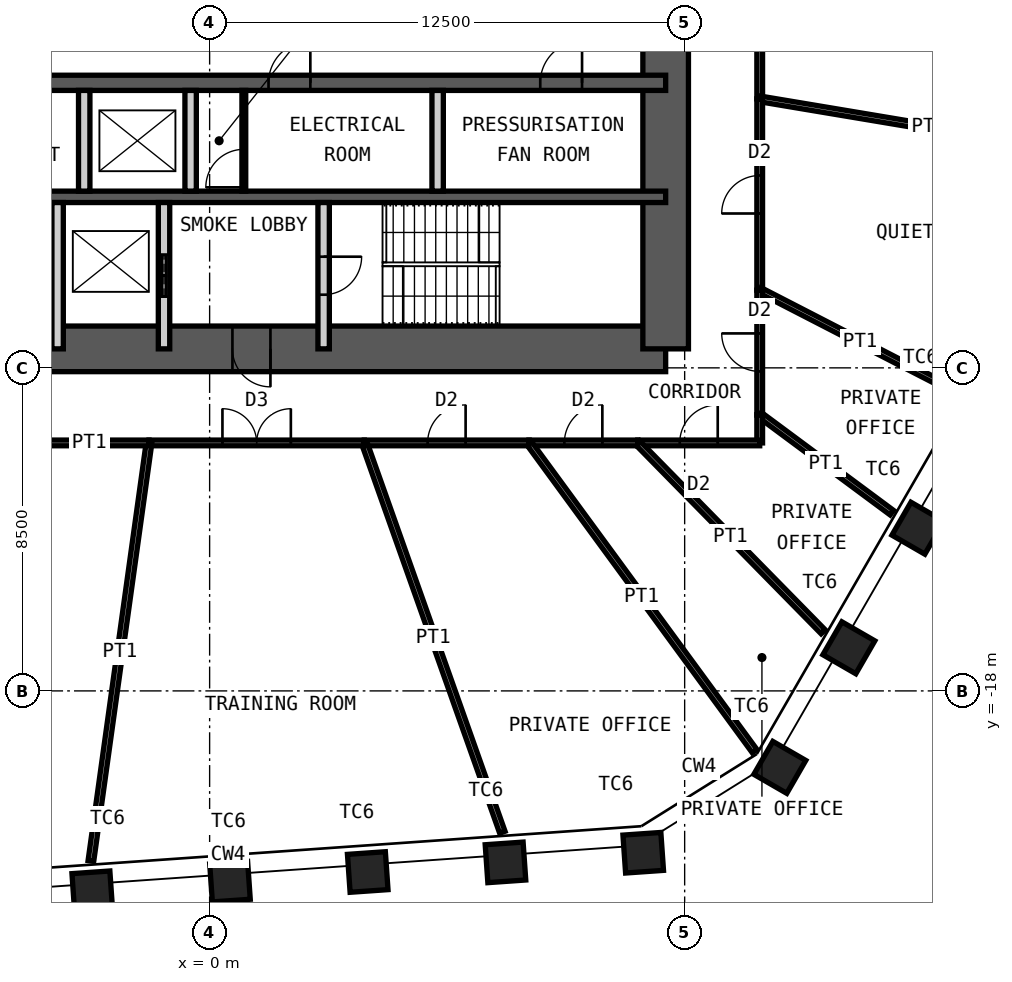
"""IFC4 building model, lengths in metres.
Left out: names, types, materials, properties, quantities, classifications, styles, units other than length and angle.
Written with IfcOpenShell. Run it as: python <this file> out.ifc"""

import sys

from ifc_helpers import new_model, si_unit, direction, frame, frame_2d, origin, origin_2d, place, context, subcontext, project, spatial, rectangle, hollow_rectangle, extrude, element, fill, save


model = new_model("IFC4")
c1 = context("Model", 3, precision=1e-05, world=origin(), true_north=direction((0.0, 1.0)))
c2 = subcontext(c1, "Body", "Model", "MODEL_VIEW")
j1 = project(units=[si_unit("LENGTHUNIT", "METRE"), si_unit("PLANEANGLEUNIT", "RADIAN")], contexts=[c1])
p1 = place(None, origin())
s1 = spatial("IfcSite", under=j1, at=p1, CompositionType="ELEMENT")
p2 = place(p1, origin())
s2 = spatial("IfcBuilding", under=s1, at=p2, CompositionType="ELEMENT")
p3 = place(p2, frame((0.0, 0.0, 239.2)))
s3 = spatial("IfcBuildingStorey", under=s2, at=p3, CompositionType="ELEMENT", Elevation=239.2)
for number, where, z_axis, x_axis in (
    (1, (18.637, -13.719, 0.0), (0.0, 0.0, 1.0), (0.5, 0.866, 0.0)),
    (2, (16.821, -16.866, 0.0), (0.0, 0.0, 1.0), (0.5, 0.866, 0.0)),
    (3, (15.004, -20.012, 0.0), (0.0, 0.0, 1.0), (0.5, 0.866, 0.0)),
    (4, (11.41, -22.258, 0.0), (0.0, 0.0, 1.0), (0.998, 0.07, 0.0)),
    (5, (7.785, -22.512, 0.0), (0.0, 0.0, 1.0), (0.998, 0.07, 0.0)),
    (6, (4.16, -22.765, 0.0), (0.0, 0.0, 1.0), (0.998, 0.07, 0.0)),
    (7, (0.536, -23.019, 0.0), (0.0, 0.0, 1.0), (0.998, 0.07, 0.0)),
    (8, (-3.089, -23.272, 0.0), (0.0, 0.0, 1.0), (0.998, 0.07, 0.0)),
):
    element("IfcColumn", number, at=place(p3, frame(where, z_axis=z_axis, x_axis=x_axis)), inside=s3, PredefinedType="COLUMN", context=c2, shape_type="SweptSolid", body=[
        extrude(hollow_rectangle(XDim=1.0, YDim=1.0, WallThickness=0.06, at=origin_2d()), origin(), (0.0, 0.0, 1.0), 4.2),
    ])
p4 = place(p3, frame((-12.0, -9.0, 0.0), z_axis=(0.0, 0.0, 1.0), x_axis=(1.0, 0.0, 0.0)))
e9 = element("IfcWall", 9, at=p4, inside=s3, PredefinedType="SHEAR", context=c2, shape_type="SweptSolid", body=[
    extrude(rectangle(XDim=24.0, YDim=1.2, at=frame_2d((12.0, 0.0))), origin(), (0.0, 0.0, 1.0), 4.2),
])
p5 = place(p4, frame((1.35, 0.0, 0.0)))
e10 = element("IfcOpeningElement", 10, at=p5, cuts=e9, PredefinedType="OPENING", context=c2, shape_type="SweptSolid", body=[
    extrude(rectangle(XDim=1.0, YDim=2.1, at=frame_2d((0.5, 1.05))), frame((0.0, 0.61, 0.0), z_axis=(0.0, -1.0, 0.0), x_axis=(1.0, 0.0, 0.0)), (0.0, 0.0, 1.0), 1.22),
])
p6 = place(p4, frame((5.325, 0.0, 0.0)))
e11 = element("IfcOpeningElement", 11, at=p6, cuts=e9, PredefinedType="OPENING", context=c2, shape_type="SweptSolid", body=[
    extrude(rectangle(XDim=1.15, YDim=2.1, at=frame_2d((0.575, 1.05))), frame((0.0, 0.61, 0.0), z_axis=(0.0, -1.0, 0.0), x_axis=(1.0, 0.0, 0.0)), (0.0, 0.0, 1.0), 1.22),
])
p7 = place(p4, frame((12.6, 0.0, 0.0)))
e12 = element("IfcOpeningElement", 12, at=p7, cuts=e9, PredefinedType="OPENING", context=c2, shape_type="SweptSolid", body=[
    extrude(rectangle(XDim=1.0, YDim=2.1, at=frame_2d((0.5, 1.05))), frame((0.0, 0.61, 0.0), z_axis=(0.0, -1.0, 0.0), x_axis=(1.0, 0.0, 0.0)), (0.0, 0.0, 1.0), 1.22),
])
p8 = place(p3, frame((12.0, -9.0, 0.0), z_axis=(0.0, 0.0, 1.0), x_axis=(0.0, 1.0, 0.0)))
e13 = element("IfcWall", 13, at=p8, inside=s3, PredefinedType="SHEAR", context=c2, shape_type="SweptSolid", body=[
    extrude(rectangle(XDim=18.0, YDim=1.2, at=frame_2d((9.0, 0.0))), origin(), (0.0, 0.0, 1.0), 4.2),
])
p9 = place(p8, frame((8.1, 0.0, 0.0)))
e14 = element("IfcOpeningElement", 14, at=p9, cuts=e13, PredefinedType="OPENING", context=c2, shape_type="SweptSolid", body=[
    extrude(rectangle(XDim=1.8, YDim=2.1, at=frame_2d((0.9, 1.05))), frame((0.0, 0.61, 0.0), z_axis=(0.0, -1.0, 0.0), x_axis=(1.0, 0.0, 0.0)), (0.0, 0.0, 1.0), 1.22),
])
p10 = place(p3, frame((-12.0, -2.0, 0.0), z_axis=(0.0, 0.0, 1.0), x_axis=(1.0, 0.0, 0.0)))
e15 = element("IfcWall", 15, at=p10, inside=s3, PredefinedType="SHEAR", context=c2, shape_type="SweptSolid", body=[
    extrude(rectangle(XDim=24.0, YDim=0.4, at=frame_2d((12.0, 0.0))), origin(), (0.0, 0.0, 1.0), 4.2),
])
p11 = place(p10, frame((1.1, 0.0, 0.0)))
e16 = element("IfcOpeningElement", 16, at=p11, cuts=e15, PredefinedType="OPENING", context=c2, shape_type="SweptSolid", body=[
    extrude(rectangle(XDim=1.1, YDim=2.1, at=frame_2d((0.55, 1.05))), frame((0.0, 0.21, 0.0), z_axis=(0.0, -1.0, 0.0), x_axis=(1.0, 0.0, 0.0)), (0.0, 0.0, 1.0), 0.42),
])
p12 = place(p10, frame((13.55, 0.0, 0.0)))
e17 = element("IfcOpeningElement", 17, at=p12, cuts=e15, PredefinedType="OPENING", context=c2, shape_type="SweptSolid", body=[
    extrude(rectangle(XDim=1.1, YDim=2.1, at=frame_2d((0.55, 1.05))), frame((0.0, 0.21, 0.0), z_axis=(0.0, -1.0, 0.0), x_axis=(1.0, 0.0, 0.0)), (0.0, 0.0, 1.0), 0.42),
])
p13 = place(p10, frame((20.7, 0.0, 0.0)))
e18 = element("IfcOpeningElement", 18, at=p13, cuts=e15, PredefinedType="OPENING", context=c2, shape_type="SweptSolid", body=[
    extrude(rectangle(XDim=1.1, YDim=2.1, at=frame_2d((0.55, 1.05))), frame((0.0, 0.21, 0.0), z_axis=(0.0, -1.0, 0.0), x_axis=(1.0, 0.0, 0.0)), (0.0, 0.0, 1.0), 0.42),
])
p14 = place(p10, frame((4.0, 0.0, 0.0)))
e19 = element("IfcOpeningElement", 19, at=p14, cuts=e15, PredefinedType="OPENING", context=c2, shape_type="SweptSolid", body=[
    extrude(rectangle(XDim=1.0, YDim=2.1, at=frame_2d((0.5, 1.05))), frame((0.0, 0.21, 0.0), z_axis=(0.0, -1.0, 0.0), x_axis=(1.0, 0.0, 0.0)), (0.0, 0.0, 1.0), 0.42),
])
p15 = place(p10, frame((6.8, 0.0, 0.0)))
e20 = element("IfcOpeningElement", 20, at=p15, cuts=e15, PredefinedType="OPENING", context=c2, shape_type="SweptSolid", body=[
    extrude(rectangle(XDim=1.0, YDim=2.1, at=frame_2d((0.5, 1.05))), frame((0.0, 0.21, 0.0), z_axis=(0.0, -1.0, 0.0), x_axis=(1.0, 0.0, 0.0)), (0.0, 0.0, 1.0), 0.42),
])
p16 = place(p3, frame((-12.0, -5.0, 0.0), z_axis=(0.0, 0.0, 1.0), x_axis=(1.0, 0.0, 0.0)))
e21 = element("IfcWall", 21, at=p16, inside=s3, PredefinedType="SHEAR", context=c2, shape_type="SweptSolid", body=[
    extrude(rectangle(XDim=24.0, YDim=0.3, at=frame_2d((12.0, 0.0))), origin(), (0.0, 0.0, 1.0), 4.2),
])
for number, where, z_axis, x_axis in (
    (22, (-3.3, -4.85, 0.0), (0.0, 0.0, 1.0), (0.0, 1.0, 0.0)),
    (23, (-0.5, -4.85, 0.0), (0.0, 0.0, 1.0), (0.0, 1.0, 0.0)),
    (24, (6.0, -4.85, 0.0), (0.0, 0.0, 1.0), (0.0, 1.0, 0.0)),
):
    element("IfcWall", number, at=place(p3, frame(where, z_axis=z_axis, x_axis=x_axis)), inside=s3, PredefinedType="PARTITIONING", context=c2, shape_type="SweptSolid", body=[
        extrude(rectangle(XDim=2.65, YDim=0.3, at=frame_2d((1.325, 0.0))), origin(), (0.0, 0.0, 1.0), 3.98),
    ])
p17 = place(p3, frame((-4.0, -9.0, 0.0), z_axis=(0.0, 0.0, 1.0), x_axis=(0.0, 1.0, 0.0)))
e25 = element("IfcWall", 25, at=p17, inside=s3, PredefinedType="PARTITIONING", context=c2, shape_type="SweptSolid", body=[
    extrude(rectangle(XDim=3.85, YDim=0.3, at=frame_2d((1.925, 0.0))), origin(), (0.0, 0.0, 1.0), 3.98),
])
p18 = place(p3, frame((-1.2, -9.0, 0.0), z_axis=(0.0, 0.0, 1.0), x_axis=(0.0, 1.0, 0.0)))
e26 = element("IfcWall", 26, at=p18, inside=s3, PredefinedType="PARTITIONING", context=c2, shape_type="SweptSolid", body=[
    extrude(rectangle(XDim=3.85, YDim=0.3, at=frame_2d((1.925, 0.0))), origin(), (0.0, 0.0, 1.0), 3.98),
])
p19 = place(p18, frame((1.375, 0.0, 0.0)))
e27 = element("IfcOpeningElement", 27, at=p19, cuts=e26, PredefinedType="OPENING", context=c2, shape_type="SweptSolid", body=[
    extrude(rectangle(XDim=1.1, YDim=2.4, at=frame_2d((0.55, 1.2))), frame((0.0, 0.16, 0.0), z_axis=(0.0, -1.0, 0.0), x_axis=(1.0, 0.0, 0.0)), (0.0, 0.0, 1.0), 0.32),
])
p20 = place(p3, frame((3.0, -9.0, 0.0), z_axis=(0.0, 0.0, 1.0), x_axis=(0.0, 1.0, 0.0)))
e28 = element("IfcWall", 28, at=p20, inside=s3, PredefinedType="PARTITIONING", context=c2, shape_type="SweptSolid", body=[
    extrude(rectangle(XDim=3.85, YDim=0.3, at=frame_2d((1.925, 0.0))), origin(), (0.0, 0.0, 1.0), 3.98),
])
p21 = place(p20, frame((1.425, 0.0, 0.0)))
e29 = element("IfcOpeningElement", 29, at=p21, cuts=e28, PredefinedType="OPENING", context=c2, shape_type="SweptSolid", body=[
    extrude(rectangle(XDim=1.0, YDim=2.1, at=frame_2d((0.5, 1.05))), frame((0.0, 0.16, 0.0), z_axis=(0.0, -1.0, 0.0), x_axis=(1.0, 0.0, 0.0)), (0.0, 0.0, 1.0), 0.32),
])
p22 = place(p3, frame((0.9, -4.85, 0.0), z_axis=(0.0, 0.0, 1.0), x_axis=(0.0, 1.0, 0.0)))
e30 = element("IfcWall", 30, at=p22, inside=s3, PredefinedType="PARTITIONING", context=c2, shape_type="SweptSolid", body=[
    extrude(rectangle(XDim=2.65, YDim=0.1, at=frame_2d((1.325, 0.0))), origin(), (0.0, 0.0, 1.0), 3.98),
])
p23 = place(p22, frame((0.1, 0.0, 0.0)))
e31 = element("IfcOpeningElement", 31, at=p23, cuts=e30, PredefinedType="OPENING", context=c2, shape_type="SweptSolid", body=[
    extrude(rectangle(XDim=1.0, YDim=2.4, at=frame_2d((0.5, 1.2))), frame((0.0, 0.06, 0.0), z_axis=(0.0, -1.0, 0.0), x_axis=(1.0, 0.0, 0.0)), (0.0, 0.0, 1.0), 0.12),
])
p24 = place(p3, frame((14.475, 3.475, 0.0), z_axis=(0.0, 0.0, 1.0), x_axis=(0.0, -1.0, 0.0)))
e32 = element("IfcWall", 32, at=p24, inside=s3, PredefinedType="PARTITIONING", context=c2, shape_type="SweptSolid", body=[
    extrude(rectangle(XDim=5.896, YDim=0.15, at=frame_2d((2.948, 0.0))), origin(), (0.0, 0.0, 1.0), 4.03),
])
p25 = place(p24, frame((2.448, 0.0, 0.0)))
e33 = element("IfcOpeningElement", 33, at=p25, cuts=e32, PredefinedType="OPENING", context=c2, shape_type="SweptSolid", body=[
    extrude(rectangle(XDim=1.0, YDim=2.4, at=frame_2d((0.5, 1.2))), frame((0.0, 0.085, 0.0), z_axis=(0.0, -1.0, 0.0), x_axis=(1.0, 0.0, 0.0)), (0.0, 0.0, 1.0), 0.17),
])
p26 = place(p3, frame((23.383, -3.912, 0.0), z_axis=(0.0, 0.0, 1.0), x_axis=(-0.986293651891, 0.164999491631, 0.0)))
e34 = element("IfcWall", 34, at=p26, inside=s3, PredefinedType="PARTITIONING", context=c2, shape_type="SweptSolid", body=[
    extrude(rectangle(XDim=9.032, YDim=0.15, at=frame_2d((4.516, 0.0))), origin(), (0.0, 0.0, 1.0), 3.43),
])
p27 = place(p3, frame((14.475, -2.422, 0.0), z_axis=(0.0, 0.0, 1.0), x_axis=(0.0, -1.0, 0.0)))
e35 = element("IfcWall", 35, at=p27, inside=s3, PredefinedType="PARTITIONING", context=c2, shape_type="SweptSolid", body=[
    extrude(rectangle(XDim=5.033, YDim=0.15, at=frame_2d((2.517, 0.0))), origin(), (0.0, 0.0, 1.0), 4.03),
])
p28 = place(p27, frame((2.017, 0.0, 0.0)))
e36 = element("IfcOpeningElement", 36, at=p28, cuts=e35, PredefinedType="OPENING", context=c2, shape_type="SweptSolid", body=[
    extrude(rectangle(XDim=1.0, YDim=2.4, at=frame_2d((0.5, 1.2))), frame((0.0, 0.085, 0.0), z_axis=(0.0, -1.0, 0.0), x_axis=(1.0, 0.0, 0.0)), (0.0, 0.0, 1.0), 0.17),
])
p29 = place(p3, frame((19.759, -10.177, 0.0), z_axis=(0.0, 0.0, 1.0), x_axis=(-0.889015092721, 0.457877893017, 0.0)))
e37 = element("IfcWall", 37, at=p29, inside=s3, PredefinedType="PARTITIONING", context=c2, shape_type="SweptSolid", body=[
    extrude(rectangle(XDim=5.944, YDim=0.15, at=frame_2d((2.972, 0.0))), origin(), (0.0, 0.0, 1.0), 3.43),
])
p30 = place(p3, frame((14.475, -7.455, 0.0), z_axis=(0.0, 0.0, 1.0), x_axis=(0.0, -1.0, 0.0)))
e38 = element("IfcWall", 38, at=p30, inside=s3, PredefinedType="PARTITIONING", context=c2, shape_type="SweptSolid", body=[
    extrude(rectangle(XDim=3.277, YDim=0.15, at=frame_2d((1.639, 0.0))), origin(), (0.0, 0.0, 1.0), 4.03),
])
p31 = place(p30, frame((1.139, 0.0, 0.0)))
e39 = element("IfcOpeningElement", 39, at=p31, cuts=e38, PredefinedType="OPENING", context=c2, shape_type="SweptSolid", body=[
    extrude(rectangle(XDim=1.0, YDim=2.4, at=frame_2d((0.5, 1.2))), frame((0.0, 0.085, 0.0), z_axis=(0.0, -1.0, 0.0), x_axis=(1.0, 0.0, 0.0)), (0.0, 0.0, 1.0), 0.17),
])
p32 = place(p3, frame((17.951, -13.309, 0.0), z_axis=(0.0, 0.0, 1.0), x_axis=(-0.803285242674, 0.595594508791, 0.0)))
e40 = element("IfcWall", 40, at=p32, inside=s3, PredefinedType="PARTITIONING", context=c2, shape_type="SweptSolid", body=[
    extrude(rectangle(XDim=4.327, YDim=0.15, at=frame_2d((2.164, 0.0))), origin(), (0.0, 0.0, 1.0), 3.43),
])
p33 = place(p3, frame((14.475, -10.732, 0.0), z_axis=(0.0, 0.0, 1.0), x_axis=(0.0, -1.0, 0.0)))
e41 = element("IfcWall", 41, at=p33, inside=s3, PredefinedType="PARTITIONING", context=c2, shape_type="SweptSolid", body=[
    extrude(rectangle(XDim=0.743, YDim=0.15, at=frame_2d((0.372, 0.0))), origin(), (0.0, 0.0, 1.0), 4.03),
])
p34 = place(p3, frame((14.475, -11.475, 0.0), z_axis=(0.0, 0.0, 1.0), x_axis=(-1.0, 0.0, 0.0)))
e42 = element("IfcWall", 42, at=p34, inside=s3, PredefinedType="PARTITIONING", context=c2, shape_type="SweptSolid", body=[
    extrude(rectangle(XDim=3.209, YDim=0.15, at=frame_2d((1.605, 0.0))), origin(), (0.0, 0.0, 1.0), 4.03),
])
p35 = place(p34, frame((1.105, 0.0, 0.0)))
e43 = element("IfcOpeningElement", 43, at=p35, cuts=e42, PredefinedType="OPENING", context=c2, shape_type="SweptSolid", body=[
    extrude(rectangle(XDim=1.0, YDim=2.4, at=frame_2d((0.5, 1.2))), frame((0.0, 0.085, 0.0), z_axis=(0.0, -1.0, 0.0), x_axis=(1.0, 0.0, 0.0)), (0.0, 0.0, 1.0), 0.17),
])
p36 = place(p3, frame((16.145, -16.444, 0.0), z_axis=(0.0, 0.0, 1.0), x_axis=(-0.700591378209, 0.71356269576, 0.0)))
e44 = element("IfcWall", 44, at=p36, inside=s3, PredefinedType="PARTITIONING", context=c2, shape_type="SweptSolid", body=[
    extrude(rectangle(XDim=6.964, YDim=0.15, at=frame_2d((3.482, 0.0))), origin(), (0.0, 0.0, 1.0), 3.43),
])
p37 = place(p3, frame((11.266, -11.475, 0.0), z_axis=(0.0, 0.0, 1.0), x_axis=(-1.0, 0.0, 0.0)))
e45 = element("IfcWall", 45, at=p37, inside=s3, PredefinedType="PARTITIONING", context=c2, shape_type="SweptSolid", body=[
    extrude(rectangle(XDim=2.863, YDim=0.15, at=frame_2d((1.432, 0.0))), origin(), (0.0, 0.0, 1.0), 4.03),
])
p38 = place(p37, frame((0.932, 0.0, 0.0)))
e46 = element("IfcOpeningElement", 46, at=p38, cuts=e45, PredefinedType="OPENING", context=c2, shape_type="SweptSolid", body=[
    extrude(rectangle(XDim=1.0, YDim=2.4, at=frame_2d((0.5, 1.2))), frame((0.0, 0.085, 0.0), z_axis=(0.0, -1.0, 0.0), x_axis=(1.0, 0.0, 0.0)), (0.0, 0.0, 1.0), 0.17),
])
p39 = place(p3, frame((14.339, -19.582, 0.0), z_axis=(0.0, 0.0, 1.0), x_axis=(-0.590789413226, 0.806825798559, 0.0)))
e47 = element("IfcWall", 47, at=p39, inside=s3, PredefinedType="PARTITIONING", context=c2, shape_type="SweptSolid", body=[
    extrude(rectangle(XDim=10.048, YDim=0.15, at=frame_2d((5.024, 0.0))), origin(), (0.0, 0.0, 1.0), 2.93),
])
p40 = place(p3, frame((8.403, -11.475, 0.0), z_axis=(0.0, 0.0, 1.0), x_axis=(-1.0, 0.0, 0.0)))
e48 = element("IfcWall", 48, at=p40, inside=s3, PredefinedType="PARTITIONING", context=c2, shape_type="SweptSolid", body=[
    extrude(rectangle(XDim=4.333, YDim=0.15, at=frame_2d((2.167, 0.0))), origin(), (0.0, 0.0, 1.0), 4.03),
])
p41 = place(p40, frame((1.667, 0.0, 0.0)))
e49 = element("IfcOpeningElement", 49, at=p41, cuts=e48, PredefinedType="OPENING", context=c2, shape_type="SweptSolid", body=[
    extrude(rectangle(XDim=1.0, YDim=2.4, at=frame_2d((0.5, 1.2))), frame((0.0, 0.085, 0.0), z_axis=(0.0, -1.0, 0.0), x_axis=(1.0, 0.0, 0.0)), (0.0, 0.0, 1.0), 0.17),
])
p42 = place(p3, frame((7.703, -21.719, 0.0), z_axis=(0.0, 0.0, 1.0), x_axis=(-0.334269551553, 0.942477515331, 0.0)))
e50 = element("IfcWall", 50, at=p42, inside=s3, PredefinedType="PARTITIONING", context=c2, shape_type="SweptSolid", body=[
    extrude(rectangle(XDim=10.869, YDim=0.15, at=frame_2d((5.435, 0.0))), origin(), (0.0, 0.0, 1.0), 3.43),
])
p43 = place(p3, frame((4.07, -11.475, 0.0), z_axis=(0.0, 0.0, 1.0), x_axis=(-1.0, 0.0, 0.0)))
e51 = element("IfcWall", 51, at=p43, inside=s3, PredefinedType="PARTITIONING", context=c2, shape_type="SweptSolid", body=[
    extrude(rectangle(XDim=5.665, YDim=0.15, at=frame_2d((2.832, 0.0))), origin(), (0.0, 0.0, 1.0), 4.03),
])
p44 = place(p43, frame((1.932, 0.0, 0.0)))
e52 = element("IfcOpeningElement", 52, at=p44, cuts=e51, PredefinedType="OPENING", context=c2, shape_type="SweptSolid", body=[
    extrude(rectangle(XDim=1.8, YDim=2.4, at=frame_2d((0.9, 1.2))), frame((0.0, 0.085, 0.0), z_axis=(0.0, -1.0, 0.0), x_axis=(1.0, 0.0, 0.0)), (0.0, 0.0, 1.0), 0.17),
])
p45 = place(p3, frame((-3.124, -22.475, 0.0), z_axis=(0.0, 0.0, 1.0), x_axis=(0.137683997015, 0.990476207168, 0.0)))
e53 = element("IfcWall", 53, at=p45, inside=s3, PredefinedType="PARTITIONING", context=c2, shape_type="SweptSolid", body=[
    extrude(rectangle(XDim=11.105, YDim=0.15, at=frame_2d((5.553, 0.0))), origin(), (0.0, 0.0, 1.0), 3.43),
])
p46 = place(p3, frame((-1.595, -11.475, 0.0), z_axis=(0.0, 0.0, 1.0), x_axis=(-1.0, 0.0, 0.0)))
e54 = element("IfcWall", 54, at=p46, inside=s3, PredefinedType="PARTITIONING", context=c2, shape_type="SweptSolid", body=[
    extrude(rectangle(XDim=7.864, YDim=0.15, at=frame_2d((3.932, 0.0))), origin(), (0.0, 0.0, 1.0), 4.03),
])
p47 = place(p46, frame((3.032, 0.0, 0.0)))
e55 = element("IfcOpeningElement", 55, at=p47, cuts=e54, PredefinedType="OPENING", context=c2, shape_type="SweptSolid", body=[
    extrude(rectangle(XDim=1.8, YDim=2.4, at=frame_2d((0.9, 1.2))), frame((0.0, 0.085, 0.0), z_axis=(0.0, -1.0, 0.0), x_axis=(1.0, 0.0, 0.0)), (0.0, 0.0, 1.0), 0.17),
])
p48 = place(p7, origin())
e56 = element("IfcDoor", 56, at=p48, inside=s3, OperationType="SINGLE_SWING_RIGHT", PredefinedType="DOOR", context=c2, shape_type="SweptSolid", body=[
    extrude(rectangle(XDim=1.0, YDim=2.1, at=frame_2d((0.5, 1.05))), frame((0.0, 0.025, 0.0), z_axis=(0.0, -1.0, 0.0), x_axis=(1.0, 0.0, 0.0)), (0.0, 0.0, 1.0), 0.05),
])
fill(e12, e56)
p49 = place(p21, origin())
e57 = element("IfcDoor", 57, at=p49, inside=s3, OperationType="SINGLE_SWING_RIGHT", PredefinedType="DOOR", context=c2, shape_type="SweptSolid", body=[
    extrude(rectangle(XDim=1.0, YDim=2.1, at=frame_2d((0.5, 1.05))), frame((0.0, 0.025, 0.0), z_axis=(0.0, -1.0, 0.0), x_axis=(1.0, 0.0, 0.0)), (0.0, 0.0, 1.0), 0.05),
])
fill(e29, e57)
p50 = place(p12, origin())
e58 = element("IfcDoor", 58, at=p50, inside=s3, OperationType="SINGLE_SWING_LEFT", PredefinedType="DOOR", context=c2, shape_type="SweptSolid", body=[
    extrude(rectangle(XDim=1.1, YDim=2.1, at=frame_2d((0.55, 1.05))), frame((0.0, 0.025, 0.0), z_axis=(0.0, -1.0, 0.0), x_axis=(1.0, 0.0, 0.0)), (0.0, 0.0, 1.0), 0.05),
])
fill(e17, e58)
p51 = place(p13, origin())
e59 = element("IfcDoor", 59, at=p51, inside=s3, OperationType="SINGLE_SWING_LEFT", PredefinedType="DOOR", context=c2, shape_type="SweptSolid", body=[
    extrude(rectangle(XDim=1.1, YDim=2.1, at=frame_2d((0.55, 1.05))), frame((0.0, 0.025, 0.0), z_axis=(0.0, -1.0, 0.0), x_axis=(1.0, 0.0, 0.0)), (0.0, 0.0, 1.0), 0.05),
])
fill(e18, e59)
p52 = place(p19, origin())
e60 = element("IfcDoor", 60, at=p52, inside=s3, OperationType="DOUBLE_DOOR_SLIDING", PredefinedType="DOOR", context=c2, shape_type="SweptSolid", body=[
    extrude(rectangle(XDim=1.1, YDim=2.4, at=frame_2d((0.55, 1.2))), frame((0.0, 0.025, 0.0), z_axis=(0.0, -1.0, 0.0), x_axis=(1.0, 0.0, 0.0)), (0.0, 0.0, 1.0), 0.05),
])
fill(e27, e60)
p53 = place(p23, origin())
e61 = element("IfcDoor", 61, at=p53, inside=s3, OperationType="SINGLE_SWING_RIGHT", PredefinedType="DOOR", context=c2, shape_type="SweptSolid", body=[
    extrude(rectangle(XDim=1.0, YDim=2.4, at=frame_2d((0.5, 1.2))), frame((0.0, 0.025, 0.0), z_axis=(0.0, -1.0, 0.0), x_axis=(1.0, 0.0, 0.0)), (0.0, 0.0, 1.0), 0.05),
])
fill(e31, e61)
p54 = place(p28, origin())
e62 = element("IfcDoor", 62, at=p54, inside=s3, OperationType="SINGLE_SWING_RIGHT", PredefinedType="DOOR", context=c2, shape_type="SweptSolid", body=[
    extrude(rectangle(XDim=1.0, YDim=2.4, at=frame_2d((0.5, 1.2))), frame((0.0, 0.025, 0.0), z_axis=(0.0, -1.0, 0.0), x_axis=(1.0, 0.0, 0.0)), (0.0, 0.0, 1.0), 0.05),
])
fill(e36, e62)
p55 = place(p31, origin())
e63 = element("IfcDoor", 63, at=p55, inside=s3, OperationType="SINGLE_SWING_LEFT", PredefinedType="DOOR", context=c2, shape_type="SweptSolid", body=[
    extrude(rectangle(XDim=1.0, YDim=2.4, at=frame_2d((0.5, 1.2))), frame((0.0, 0.025, 0.0), z_axis=(0.0, -1.0, 0.0), x_axis=(1.0, 0.0, 0.0)), (0.0, 0.0, 1.0), 0.05),
])
fill(e39, e63)
p56 = place(p35, origin())
e64 = element("IfcDoor", 64, at=p56, inside=s3, OperationType="SINGLE_SWING_LEFT", PredefinedType="DOOR", context=c2, shape_type="SweptSolid", body=[
    extrude(rectangle(XDim=1.0, YDim=2.4, at=frame_2d((0.5, 1.2))), frame((0.0, 0.025, 0.0), z_axis=(0.0, -1.0, 0.0), x_axis=(1.0, 0.0, 0.0)), (0.0, 0.0, 1.0), 0.05),
])
fill(e43, e64)
p57 = place(p38, origin())
e65 = element("IfcDoor", 65, at=p57, inside=s3, OperationType="SINGLE_SWING_LEFT", PredefinedType="DOOR", context=c2, shape_type="SweptSolid", body=[
    extrude(rectangle(XDim=1.0, YDim=2.4, at=frame_2d((0.5, 1.2))), frame((0.0, 0.025, 0.0), z_axis=(0.0, -1.0, 0.0), x_axis=(1.0, 0.0, 0.0)), (0.0, 0.0, 1.0), 0.05),
])
fill(e46, e65)
p58 = place(p41, origin())
e66 = element("IfcDoor", 66, at=p58, inside=s3, OperationType="SINGLE_SWING_LEFT", PredefinedType="DOOR", context=c2, shape_type="SweptSolid", body=[
    extrude(rectangle(XDim=1.0, YDim=2.4, at=frame_2d((0.5, 1.2))), frame((0.0, 0.025, 0.0), z_axis=(0.0, -1.0, 0.0), x_axis=(1.0, 0.0, 0.0)), (0.0, 0.0, 1.0), 0.05),
])
fill(e49, e66)
p59 = place(p44, origin())
e67 = element("IfcDoor", 67, at=p59, inside=s3, OperationType="DOUBLE_DOOR_DOUBLE_SWING", PredefinedType="DOOR", context=c2, shape_type="SweptSolid", body=[
    extrude(rectangle(XDim=1.8, YDim=2.4, at=frame_2d((0.9, 1.2))), frame((0.0, 0.025, 0.0), z_axis=(0.0, -1.0, 0.0), x_axis=(1.0, 0.0, 0.0)), (0.0, 0.0, 1.0), 0.05),
])
fill(e52, e67)
save(model, sys.argv[1])
